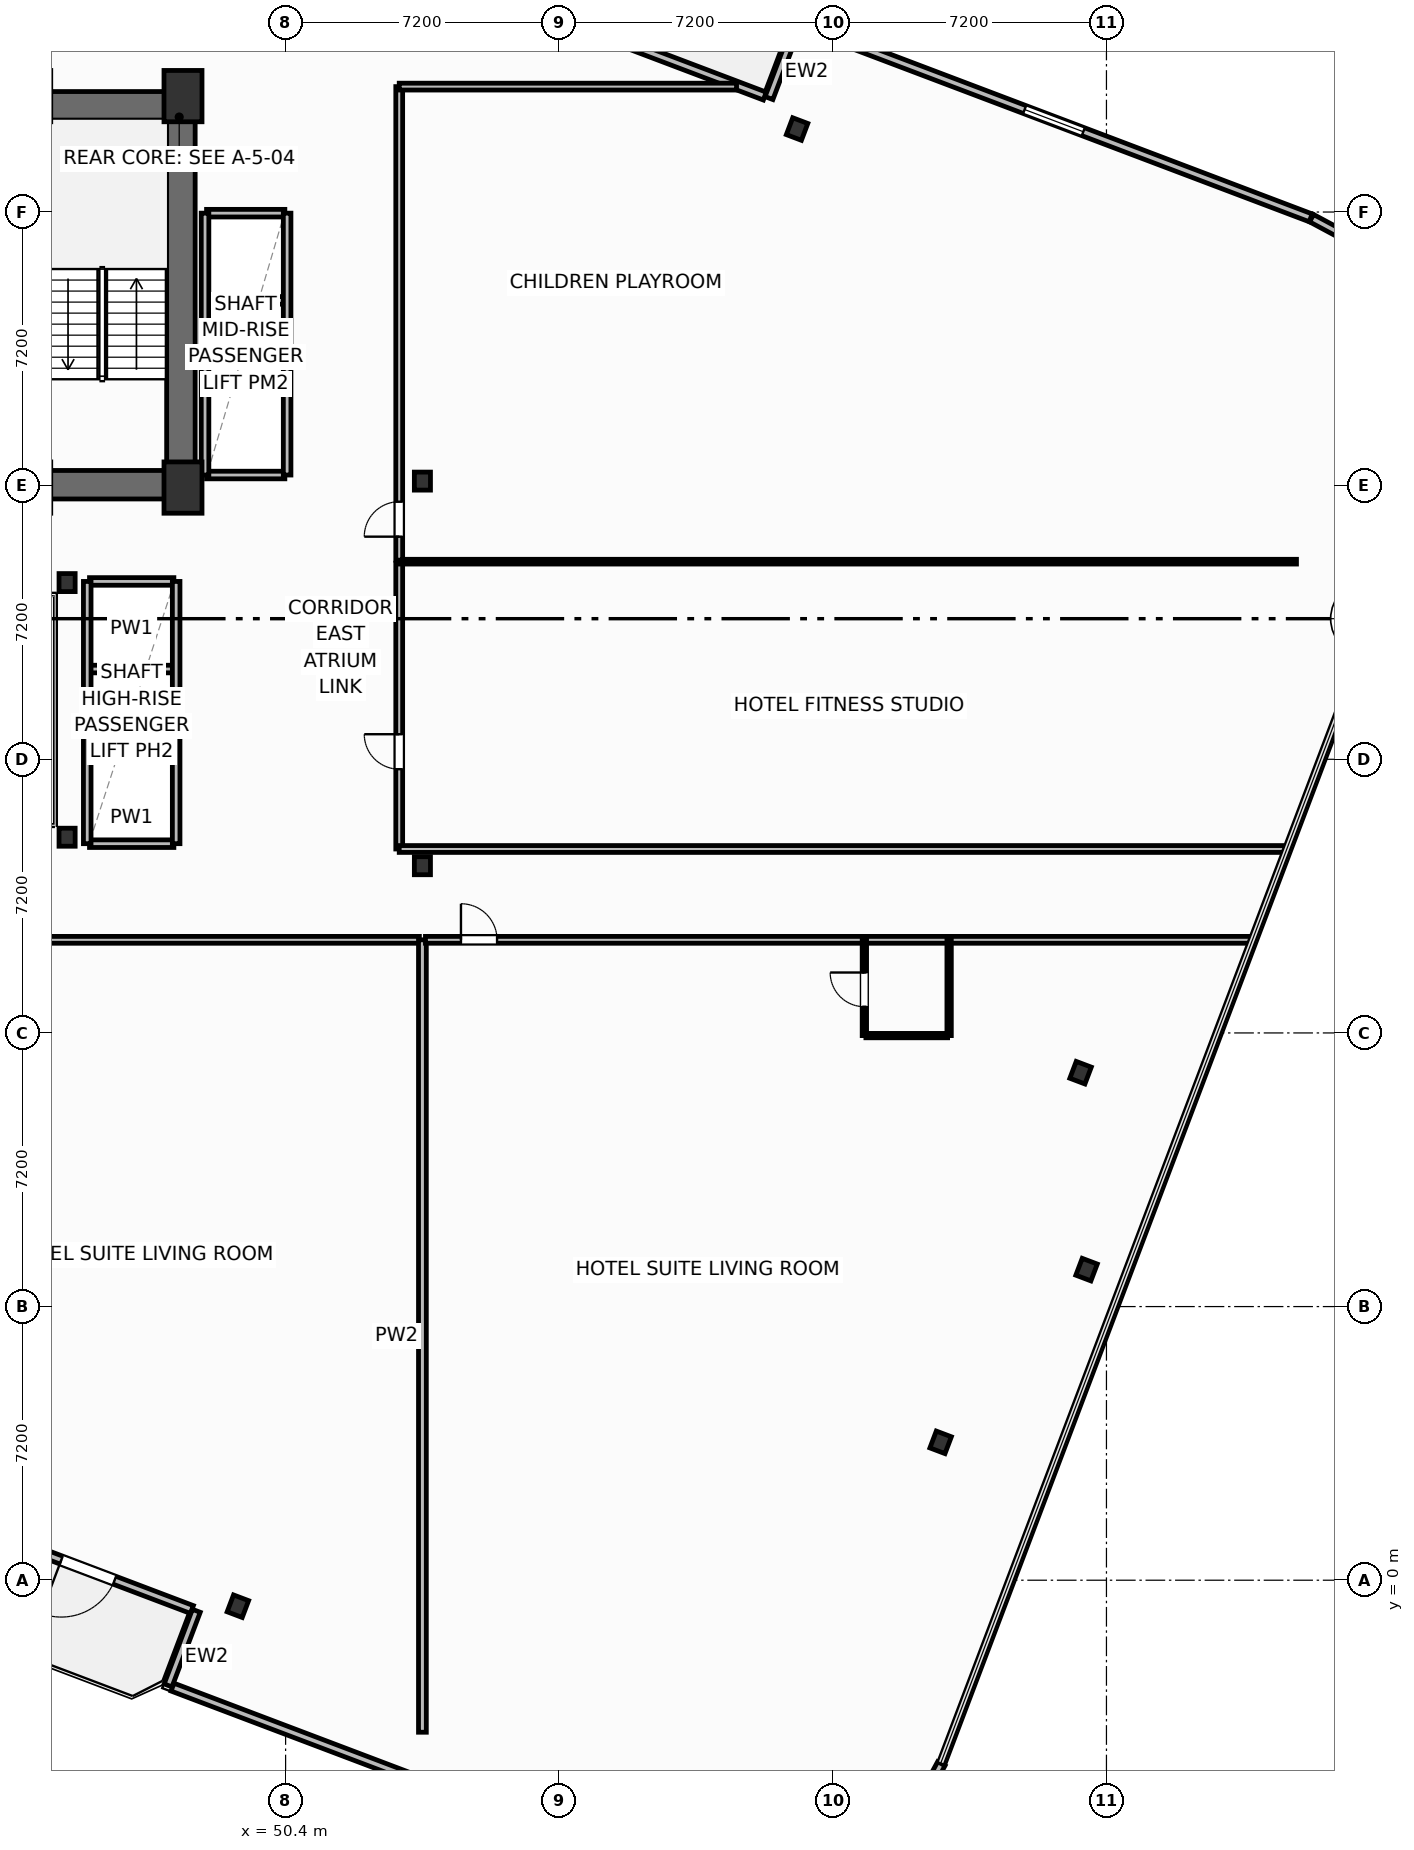
"""IFC4 building model, lengths in metres.
Left out: names, types, materials, properties, quantities, classifications, styles, units other than length and angle.
Written with IfcOpenShell. Run it as: python <this file> out.ifc"""

import sys

from ifc_helpers import new_model, si_unit, direction, frame, frame_2d, origin, origin_2d, place, context, subcontext, project, spatial, rectangle, i_section, extrude, element, fill, save


model = new_model("IFC4")
c1 = context("Model", 3, precision=1e-05, world=origin(), true_north=direction((0.0, 1.0)))
c2 = subcontext(c1, "Body", "Model", "MODEL_VIEW")
j1 = project(units=[si_unit("LENGTHUNIT", "METRE"), si_unit("PLANEANGLEUNIT", "RADIAN")], contexts=[c1])
p1 = place(None, origin())
s1 = spatial("IfcSite", under=j1, at=p1, CompositionType="ELEMENT")
p2 = place(p1, origin())
s2 = spatial("IfcBuilding", under=s1, at=p2, CompositionType="ELEMENT")
p3 = place(p2, frame((0.0, 0.0, 105.8)))
s3 = spatial("IfcBuildingStorey", under=s2, at=p3, CompositionType="ELEMENT", Elevation=105.8)
for number, where, z_axis, x_axis in (
    (1, (47.7, 28.75, 0.0), (0.0, 0.0, 1.0), (1.0, 0.0, 0.0)),
    (2, (47.7, 39.05, 0.0), (0.0, 0.0, 1.0), (1.0, 0.0, 0.0)),
):
    element("IfcColumn", number, at=place(p3, frame(where, z_axis=z_axis, x_axis=x_axis)), inside=s3, PredefinedType="COLUMN", context=c2, shape_type="SweptSolid", body=[
        extrude(rectangle(XDim=1.0, YDim=1.35, at=origin_2d()), origin(), (0.0, 0.0, 1.0), 3.7),
    ])
for number, where, z_axis, x_axis in (
    (3, (44.65, 19.55, 0.0), (0.0, 0.0, 1.0), (1.0, 0.0, 0.0)),
    (4, (44.65, 26.25, 0.0), (0.0, 0.0, 1.0), (1.0, 0.0, 0.0)),
    (5, (54.0, 18.8, 0.0), (0.0, 0.0, 1.0), (1.0, 0.0, 0.0)),
    (6, (54.0, 28.92, 0.0), (0.0, 0.0, 1.0), (1.0, 0.0, 0.0)),
):
    element("IfcColumn", number, at=place(p3, frame(where, z_axis=z_axis, x_axis=x_axis)), inside=s3, PredefinedType="COLUMN", context=c2, shape_type="SweptSolid", body=[
        extrude(i_section(OverallWidth=0.424, OverallDepth=0.474, WebThickness=0.048, FlangeThickness=0.077, FilletRadius=0.025, at=origin_2d()), origin(), (0.0, 0.0, 1.0), 3.7),
    ])
p4 = place(p3, frame((30.38, 38.795, 0.0), z_axis=(0.0, 0.0, 1.0), x_axis=(1.0, 0.0, 0.0)))
e7 = element("IfcWall", 7, at=p4, inside=s3, PredefinedType="SHEAR", context=c2, shape_type="SweptSolid", body=[
    extrude(rectangle(XDim=17.64, YDim=0.75, at=frame_2d((8.82, 0.0))), origin(), (0.0, 0.0, 1.0), 3.45),
])
p5 = place(p3, frame((47.645, 29.2, 0.0), z_axis=(0.0, 0.0, 1.0), x_axis=(0.0, 1.0, 0.0)))
e8 = element("IfcWall", 8, at=p5, inside=s3, PredefinedType="SHEAR", context=c2, shape_type="SweptSolid", body=[
    extrude(rectangle(XDim=9.22, YDim=0.75, at=frame_2d((4.61, 0.0))), origin(), (0.0, 0.0, 1.0), 3.45),
])
p6 = place(p3, frame((43.6, 28.825, 0.0), z_axis=(0.0, 0.0, 1.0), x_axis=(1.0, 0.0, 0.0)))
e9 = element("IfcWall", 9, at=p6, inside=s3, PredefinedType="SHEAR", context=c2, shape_type="SweptSolid", body=[
    extrude(rectangle(XDim=4.42, YDim=0.75, at=frame_2d((2.21, 0.0))), origin(), (0.0, 0.0, 1.0), 3.45),
])
for number, where, z_axis, x_axis in (
    (10, (49.144, -0.684, 0.0), (0.0, 0.0, 1.0), (0.935, -0.354, 0.0)),
    (11, (67.637, 3.628, 0.0), (0.0, 0.0, 1.0), (0.935, -0.354, 0.0)),
    (12, (71.477, 8.173, 0.0), (0.0, 0.0, 1.0), (0.935, -0.354, 0.0)),
    (13, (71.319, 13.354, 0.0), (0.0, 0.0, 1.0), (0.935, -0.354, 0.0)),
    (14, (63.859, 38.184, 0.0), (0.0, 0.0, 1.0), (0.935, -0.354, 0.0)),
):
    element("IfcColumn", number, at=place(p3, frame(where, z_axis=z_axis, x_axis=x_axis)), inside=s3, PredefinedType="COLUMN", context=c2, shape_type="SweptSolid", body=[
        extrude(i_section(OverallWidth=0.424, OverallDepth=0.474, WebThickness=0.048, FlangeThickness=0.077, FilletRadius=0.025, at=origin_2d()), origin(), (0.0, 0.0, 1.0), 3.7),
    ])
p7 = place(p3, frame((47.935, -0.771, 0.0), z_axis=(0.0, 0.0, 1.0), x_axis=(-0.935227640088, 0.354046976001, 0.0)))
e15 = element("IfcWall", 15, at=p7, inside=s3, PredefinedType="SOLIDWALL", context=c2, shape_type="SweptSolid", body=[
    extrude(rectangle(XDim=6.0, YDim=0.22, at=frame_2d((3.0, 0.0))), origin(), (0.0, 0.0, 1.0), 2.73),
])
p8 = place(p7, frame((2.176, 0.0, 0.0)))
e16 = element("IfcOpeningElement", 16, at=p8, cuts=e15, PredefinedType="OPENING", context=c2, shape_type="SweptSolid", body=[
    extrude(rectangle(XDim=1.5, YDim=2.25, at=frame_2d((0.75, 1.125))), frame((0.0, 0.12, 0.0), z_axis=(0.0, -1.0, 0.0), x_axis=(1.0, 0.0, 0.0)), (0.0, 0.0, 1.0), 0.24),
])
p9 = place(p3, frame((57.399, 41.175, 0.0), z_axis=(0.0, 0.0, 1.0), x_axis=(0.935227640088, -0.354046976001, 0.0)))
e17 = element("IfcWall", 17, at=p9, inside=s3, PredefinedType="SOLIDWALL", context=c2, shape_type="SweptSolid", body=[
    extrude(rectangle(XDim=6.0, YDim=0.22, at=frame_2d((3.0, 0.0))), origin(), (0.0, 0.0, 1.0), 2.73),
])
p10 = place(p9, frame((0.4, 0.0, 0.0)))
e18 = element("IfcOpeningElement", 18, at=p10, cuts=e17, PredefinedType="OPENING", context=c2, shape_type="SweptSolid", body=[
    extrude(rectangle(XDim=1.5, YDim=2.25, at=frame_2d((0.75, 1.125))), frame((0.0, 0.12, 0.0), z_axis=(0.0, -1.0, 0.0), x_axis=(1.0, 0.0, 0.0)), (0.0, 0.0, 1.0), 0.24),
])
p11 = place(p3, frame((48.051, -0.805, 0.0), z_axis=(0.0, 0.0, 1.0), x_axis=(-0.353988291547, -0.935249854022, 0.0)))
e19 = element("IfcWall", 19, at=p11, inside=s3, PredefinedType="SOLIDWALL", context=c2, shape_type="SweptSolid", body=[
    extrude(rectangle(XDim=2.1, YDim=0.22, at=frame_2d((1.05, 0.0))), origin(), (0.0, 0.0, 1.0), 2.73),
])
p12 = place(p3, frame((47.424, -2.813, 0.0), z_axis=(0.0, 0.0, 1.0), x_axis=(0.935225962032, -0.354051408614, 0.0)))
e20 = element("IfcWall", 20, at=p12, inside=s3, PredefinedType="SOLIDWALL", context=c2, shape_type="SweptSolid", body=[
    extrude(rectangle(XDim=14.347, YDim=0.22, at=frame_2d((7.173, 0.0))), origin(), (0.0, 0.0, 1.0), 2.73),
])
p13 = place(p12, frame((6.348, 0.0, 0.8)))
e21 = element("IfcOpeningElement", 21, at=p13, cuts=e20, PredefinedType="OPENING", context=c2, shape_type="SweptSolid", body=[
    extrude(rectangle(XDim=1.65, YDim=1.65, at=frame_2d((0.825, 0.825))), frame((0.0, 0.12, 0.0), z_axis=(0.0, -1.0, 0.0), x_axis=(1.0, 0.0, 0.0)), (0.0, 0.0, 1.0), 0.24),
])
p14 = place(p3, frame((67.015, -6.019, 0.0), z_axis=(0.0, 0.0, 1.0), x_axis=(0.473077364598, 0.881020889142, 0.0)))
e22 = element("IfcWall", 22, at=p14, inside=s3, PredefinedType="SOLIDWALL", context=c2, shape_type="SweptSolid", body=[
    extrude(rectangle(XDim=1.353, YDim=0.22, at=frame_2d((0.677, 0.0))), origin(), (0.0, 0.0, 1.0), 2.73),
])
p15 = place(p3, frame((78.597, 35.194, 0.0), z_axis=(0.0, 0.0, 1.0), x_axis=(-0.880948732004, 0.473211719614, 0.0)))
e23 = element("IfcWall", 23, at=p15, inside=s3, PredefinedType="SOLIDWALL", context=c2, shape_type="SweptSolid", body=[
    extrude(rectangle(XDim=1.361, YDim=0.22, at=frame_2d((0.681, 0.0))), origin(), (0.0, 0.0, 1.0), 2.73),
])
p16 = place(p3, frame((77.375, 35.847, 0.0), z_axis=(0.0, 0.0, 1.0), x_axis=(-0.935222448475, 0.354060689526, 0.0)))
e24 = element("IfcWall", 24, at=p16, inside=s3, PredefinedType="SOLIDWALL", context=c2, shape_type="SweptSolid", body=[
    extrude(rectangle(XDim=14.447, YDim=0.22, at=frame_2d((7.224, 0.0))), origin(), (0.0, 0.0, 1.0), 2.73),
])
p17 = place(p16, frame((6.399, 0.0, 0.8)))
e25 = element("IfcOpeningElement", 25, at=p17, cuts=e24, PredefinedType="OPENING", context=c2, shape_type="SweptSolid", body=[
    extrude(rectangle(XDim=1.65, YDim=1.65, at=frame_2d((0.825, 0.825))), frame((0.0, 0.12, 0.0), z_axis=(0.0, -1.0, 0.0), x_axis=(1.0, 0.0, 0.0)), (0.0, 0.0, 1.0), 0.24),
])
p18 = place(p3, frame((63.819, 40.845, 0.0), z_axis=(0.0, 0.0, 1.0), x_axis=(-0.354128791944, -0.935196663123, 0.0)))
e26 = element("IfcWall", 26, at=p18, inside=s3, PredefinedType="SOLIDWALL", context=c2, shape_type="SweptSolid", body=[
    extrude(rectangle(XDim=1.975, YDim=0.22, at=frame_2d((0.988, 0.0))), origin(), (0.0, 0.0, 1.0), 2.73),
])
p19 = place(p3, frame((39.28, 16.85, 0.0), z_axis=(0.0, 0.0, 1.0), x_axis=(1.0, 0.0, 0.0)))
e27 = element("IfcWall", 27, at=p19, inside=s3, PredefinedType="PARTITIONING", context=c2, shape_type="SweptSolid", body=[
    extrude(rectangle(XDim=14.64, YDim=0.18, at=frame_2d((7.32, 0.0))), origin(), (0.0, 0.0, 1.0), 3.45),
])
p20 = place(p19, frame((3.322, 0.0, 0.0)))
e28 = element("IfcOpeningElement", 28, at=p20, cuts=e27, PredefinedType="OPENING", context=c2, shape_type="SweptSolid", body=[
    extrude(rectangle(XDim=0.95, YDim=2.15, at=frame_2d((0.475, 1.075))), frame((0.0, 0.1, 0.0), z_axis=(0.0, -1.0, 0.0), x_axis=(1.0, 0.0, 0.0)), (0.0, 0.0, 1.0), 0.2),
])
p21 = place(p3, frame((54.0, -4.0, 0.0), z_axis=(0.0, 0.0, 1.0), x_axis=(0.0, 1.0, 0.0)))
e29 = element("IfcWall", 29, at=p21, inside=s3, PredefinedType="PARTITIONING", context=c2, shape_type="SweptSolid", body=[
    extrude(rectangle(XDim=20.85, YDim=0.205, at=frame_2d((10.425, 0.0))), origin(), (0.0, 0.0, 1.0), 3.45),
])
p22 = place(p3, frame((54.08, 16.85, 0.0), z_axis=(0.0, 0.0, 1.0), x_axis=(1.0, 0.0, 0.0)))
e30 = element("IfcWall", 30, at=p22, inside=s3, PredefinedType="PARTITIONING", context=c2, shape_type="SweptSolid", body=[
    extrude(rectangle(XDim=21.722, YDim=0.18, at=frame_2d((10.861, 0.0))), origin(), (0.0, 0.0, 1.0), 2.58),
])
p23 = place(p22, frame((0.934, 0.0, 0.0)))
e31 = element("IfcOpeningElement", 31, at=p23, cuts=e30, PredefinedType="OPENING", context=c2, shape_type="SweptSolid", body=[
    extrude(rectangle(XDim=0.95, YDim=2.15, at=frame_2d((0.475, 1.075))), frame((0.0, 0.1, 0.0), z_axis=(0.0, -1.0, 0.0), x_axis=(1.0, 0.0, 0.0)), (0.0, 0.0, 1.0), 0.2),
])
p24 = place(p3, frame((65.67, 14.33, 0.0), z_axis=(0.0, 0.0, 1.0), x_axis=(1.0, 0.0, 0.0)))
e32 = element("IfcWall", 32, at=p24, inside=s3, PredefinedType="PARTITIONING", context=c2, shape_type="SweptSolid", body=[
    extrude(rectangle(XDim=2.15, YDim=0.115, at=frame_2d((1.075, 0.0))), origin(), (0.0, 0.0, 1.0), 2.58),
])
p25 = place(p3, frame((65.63, 14.33, 0.0), z_axis=(0.0, 0.0, 1.0), x_axis=(0.0, 1.0, 0.0)))
e33 = element("IfcWall", 33, at=p25, inside=s3, PredefinedType="PARTITIONING", context=c2, shape_type="SweptSolid", body=[
    extrude(rectangle(XDim=2.52, YDim=0.115, at=frame_2d((1.26, 0.0))), origin(), (0.0, 0.0, 1.0), 3.45),
])
p26 = place(p25, frame((0.76, 0.0, 0.0)))
e34 = element("IfcOpeningElement", 34, at=p26, cuts=e33, PredefinedType="OPENING", context=c2, shape_type="SweptSolid", body=[
    extrude(rectangle(XDim=0.9, YDim=2.05, at=frame_2d((0.45, 1.025))), frame((0.0, 0.067, 0.0), z_axis=(0.0, -1.0, 0.0), x_axis=(1.0, 0.0, 0.0)), (0.0, 0.0, 1.0), 0.135),
])
p27 = place(p3, frame((67.86, 14.33, 0.0), z_axis=(0.0, 0.0, 1.0), x_axis=(0.0, 1.0, 0.0)))
e35 = element("IfcWall", 35, at=p27, inside=s3, PredefinedType="PARTITIONING", context=c2, shape_type="SweptSolid", body=[
    extrude(rectangle(XDim=2.52, YDim=0.115, at=frame_2d((1.26, 0.0))), origin(), (0.0, 0.0, 1.0), 3.45),
])
p28 = place(p3, frame((53.39, 19.24, 0.0), z_axis=(0.0, 0.0, 1.0), x_axis=(0.0, 1.0, 0.0)))
e36 = element("IfcWall", 36, at=p28, inside=s3, PredefinedType="PARTITIONING", context=c2, shape_type="SweptSolid", body=[
    extrude(rectangle(XDim=7.52, YDim=0.18, at=frame_2d((3.76, 0.0))), origin(), (0.0, 0.0, 1.0), 3.45),
])
p29 = place(p28, frame((2.1, 0.0, 0.0)))
e37 = element("IfcOpeningElement", 37, at=p29, cuts=e36, PredefinedType="OPENING", context=c2, shape_type="SweptSolid", body=[
    extrude(rectangle(XDim=0.92, YDim=2.05, at=frame_2d((0.46, 1.025))), frame((0.0, 0.1, 0.0), z_axis=(0.0, -1.0, 0.0), x_axis=(1.0, 0.0, 0.0)), (0.0, 0.0, 1.0), 0.2),
])
p30 = place(p3, frame((53.39, 26.8, 0.0), z_axis=(0.0, 0.0, 1.0), x_axis=(1.0, 0.0, 0.0)))
e38 = element("IfcWall", 38, at=p30, inside=s3, PredefinedType="PARTITIONING", context=c2, shape_type="SweptSolid", body=[
    extrude(rectangle(XDim=23.61, YDim=0.125, at=frame_2d((11.805, 0.0))), origin(), (0.0, 0.0, 1.0), 3.45),
])
p31 = place(p3, frame((53.39, 19.24, 0.0), z_axis=(0.0, 0.0, 1.0), x_axis=(1.0, 0.0, 0.0)))
e39 = element("IfcWall", 39, at=p31, inside=s3, PredefinedType="PARTITIONING", context=c2, shape_type="SweptSolid", body=[
    extrude(rectangle(XDim=23.317, YDim=0.18, at=frame_2d((11.658, 0.0))), origin(), (0.0, 0.0, 1.0), 3.45),
])
p32 = place(p3, frame((53.39, 26.84, 0.0), z_axis=(0.0, 0.0, 1.0), x_axis=(0.0, 1.0, 0.0)))
e40 = element("IfcWall", 40, at=p32, inside=s3, PredefinedType="PARTITIONING", context=c2, shape_type="SweptSolid", body=[
    extrude(rectangle(XDim=12.46, YDim=0.18, at=frame_2d((6.23, 0.0))), origin(), (0.0, 0.0, 1.0), 3.45),
])
p33 = place(p32, frame((0.618, 0.0, 0.0)))
e41 = element("IfcOpeningElement", 41, at=p33, cuts=e40, PredefinedType="OPENING", context=c2, shape_type="SweptSolid", body=[
    extrude(rectangle(XDim=0.92, YDim=2.05, at=frame_2d((0.46, 1.025))), frame((0.0, 0.1, 0.0), z_axis=(0.0, -1.0, 0.0), x_axis=(1.0, 0.0, 0.0)), (0.0, 0.0, 1.0), 0.2),
])
p34 = place(p3, frame((53.39, 39.3, 0.0), z_axis=(0.0, 0.0, 1.0), x_axis=(1.0, 0.0, 0.0)))
e42 = element("IfcWall", 42, at=p34, inside=s3, PredefinedType="PARTITIONING", context=c2, shape_type="SweptSolid", body=[
    extrude(rectangle(XDim=8.876, YDim=0.18, at=frame_2d((4.438, 0.0))), origin(), (0.0, 0.0, 1.0), 3.45),
])
for number, where, z_axis, x_axis in (
    (43, (48.32, 31.375, 0.0), (0.0, 0.0, 1.0), (1.0, 0.0, 0.0)),
    (44, (48.32, 33.675, 0.0), (0.0, 0.0, 1.0), (1.0, 0.0, 0.0)),
):
    element("IfcWall", number, at=place(p3, frame(where, z_axis=z_axis, x_axis=x_axis)), inside=s3, PredefinedType="PARTITIONING", context=c2, shape_type="SweptSolid", body=[
        extrude(rectangle(XDim=2.06, YDim=0.2, at=frame_2d((1.03, 0.0))), origin(), (0.0, 0.0, 1.0), 3.45),
    ])
p35 = place(p3, frame((48.32, 29.08, 0.0), z_axis=(0.0, 0.0, 1.0), x_axis=(1.0, 0.0, 0.0)))
e45 = element("IfcWall", 45, at=p35, inside=s3, PredefinedType="PARTITIONING", context=c2, shape_type="SweptSolid", body=[
    extrude(rectangle(XDim=2.06, YDim=0.2, at=frame_2d((1.03, 0.0))), origin(), (0.0, 0.0, 1.0), 2.662),
])
p36 = place(p3, frame((48.32, 35.97, 0.0), z_axis=(0.0, 0.0, 1.0), x_axis=(1.0, 0.0, 0.0)))
e46 = element("IfcWall", 46, at=p36, inside=s3, PredefinedType="PARTITIONING", context=c2, shape_type="SweptSolid", body=[
    extrude(rectangle(XDim=2.06, YDim=0.2, at=frame_2d((1.03, 0.0))), origin(), (0.0, 0.0, 1.0), 3.45),
])
for number, where, z_axis, x_axis in (
    (47, (48.28, 29.08, 0.0), (0.0, 0.0, 1.0), (0.0, 1.0, 0.0)),
    (48, (50.44, 29.08, 0.0), (0.0, 0.0, 1.0), (0.0, 1.0, 0.0)),
):
    element("IfcWall", number, at=place(p3, frame(where, z_axis=z_axis, x_axis=x_axis)), inside=s3, PredefinedType="PARTITIONING", context=c2, shape_type="SweptSolid", body=[
        extrude(rectangle(XDim=6.89, YDim=0.2, at=frame_2d((3.445, 0.0))), origin(), (0.0, 0.0, 1.0), 3.45),
    ])
for number, where, z_axis, x_axis in (
    (49, (45.24, 21.675, 0.0), (0.0, 0.0, 1.0), (1.0, 0.0, 0.0)),
    (50, (45.24, 23.975, 0.0), (0.0, 0.0, 1.0), (1.0, 0.0, 0.0)),
):
    element("IfcWall", number, at=place(p3, frame(where, z_axis=z_axis, x_axis=x_axis)), inside=s3, PredefinedType="PARTITIONING", context=c2, shape_type="SweptSolid", body=[
        extrude(rectangle(XDim=2.22, YDim=0.2, at=frame_2d((1.11, 0.0))), origin(), (0.0, 0.0, 1.0), 3.45),
    ])
p37 = place(p3, frame((45.24, 19.38, 0.0), z_axis=(0.0, 0.0, 1.0), x_axis=(1.0, 0.0, 0.0)))
e51 = element("IfcWall", 51, at=p37, inside=s3, PredefinedType="PARTITIONING", context=c2, shape_type="SweptSolid", body=[
    extrude(rectangle(XDim=2.22, YDim=0.2, at=frame_2d((1.11, 0.0))), origin(), (0.0, 0.0, 1.0), 2.662),
])
p38 = place(p3, frame((45.24, 26.28, 0.0), z_axis=(0.0, 0.0, 1.0), x_axis=(1.0, 0.0, 0.0)))
e52 = element("IfcWall", 52, at=p38, inside=s3, PredefinedType="PARTITIONING", context=c2, shape_type="SweptSolid", body=[
    extrude(rectangle(XDim=2.22, YDim=0.2, at=frame_2d((1.11, 0.0))), origin(), (0.0, 0.0, 1.0), 3.45),
])
for number, where, z_axis, x_axis in (
    (53, (45.18, 19.38, 0.0), (0.0, 0.0, 1.0), (0.0, 1.0, 0.0)),
    (54, (47.52, 19.38, 0.0), (0.0, 0.0, 1.0), (0.0, 1.0, 0.0)),
):
    element("IfcWall", number, at=place(p3, frame(where, z_axis=z_axis, x_axis=x_axis)), inside=s3, PredefinedType="PARTITIONING", context=c2, shape_type="SweptSolid", body=[
        extrude(rectangle(XDim=6.9, YDim=0.2, at=frame_2d((3.45, 0.0))), origin(), (0.0, 0.0, 1.0), 3.45),
    ])
p39 = place(p8, origin())
e55 = element("IfcDoor", 55, at=p39, inside=s3, OperationType="SINGLE_SWING_RIGHT", PredefinedType="DOOR", context=c2, shape_type="SweptSolid", body=[
    extrude(rectangle(XDim=1.5, YDim=2.25, at=frame_2d((0.75, 1.125))), frame((0.0, 0.025, 0.0), z_axis=(0.0, -1.0, 0.0), x_axis=(1.0, 0.0, 0.0)), (0.0, 0.0, 1.0), 0.05),
])
fill(e16, e55)
p40 = place(p17, origin())
e56 = element("IfcWindow", 56, at=p40, inside=s3, PartitioningType="SINGLE_PANEL", PredefinedType="WINDOW", context=c2, shape_type="SweptSolid", body=[
    extrude(rectangle(XDim=1.65, YDim=1.65, at=frame_2d((0.825, 0.825))), frame((0.0, 0.03, 0.0), z_axis=(0.0, -1.0, 0.0), x_axis=(1.0, 0.0, 0.0)), (0.0, 0.0, 1.0), 0.06),
])
fill(e25, e56)
p41 = place(p23, origin())
e57 = element("IfcDoor", 57, at=p41, inside=s3, OperationType="SINGLE_SWING_LEFT", PredefinedType="DOOR", context=c2, shape_type="SweptSolid", body=[
    extrude(rectangle(XDim=0.95, YDim=2.15, at=frame_2d((0.475, 1.075))), frame((0.0, 0.025, 0.0), z_axis=(0.0, -1.0, 0.0), x_axis=(1.0, 0.0, 0.0)), (0.0, 0.0, 1.0), 0.05),
])
fill(e31, e57)
p42 = place(p26, origin())
e58 = element("IfcDoor", 58, at=p42, inside=s3, OperationType="SINGLE_SWING_RIGHT", PredefinedType="DOOR", context=c2, shape_type="SweptSolid", body=[
    extrude(rectangle(XDim=0.9, YDim=2.05, at=frame_2d((0.45, 1.025))), frame((0.0, 0.025, 0.0), z_axis=(0.0, -1.0, 0.0), x_axis=(1.0, 0.0, 0.0)), (0.0, 0.0, 1.0), 0.05),
])
fill(e34, e58)
p43 = place(p29, origin())
e59 = element("IfcDoor", 59, at=p43, inside=s3, OperationType="SINGLE_SWING_RIGHT", PredefinedType="DOOR", context=c2, shape_type="SweptSolid", body=[
    extrude(rectangle(XDim=0.92, YDim=2.05, at=frame_2d((0.46, 1.025))), frame((0.0, 0.025, 0.0), z_axis=(0.0, -1.0, 0.0), x_axis=(1.0, 0.0, 0.0)), (0.0, 0.0, 1.0), 0.05),
])
fill(e37, e59)
p44 = place(p33, origin())
e60 = element("IfcDoor", 60, at=p44, inside=s3, OperationType="SINGLE_SWING_LEFT", PredefinedType="DOOR", context=c2, shape_type="SweptSolid", body=[
    extrude(rectangle(XDim=0.92, YDim=2.05, at=frame_2d((0.46, 1.025))), frame((0.0, 0.025, 0.0), z_axis=(0.0, -1.0, 0.0), x_axis=(1.0, 0.0, 0.0)), (0.0, 0.0, 1.0), 0.05),
])
fill(e41, e60)
save(model, sys.argv[1])
